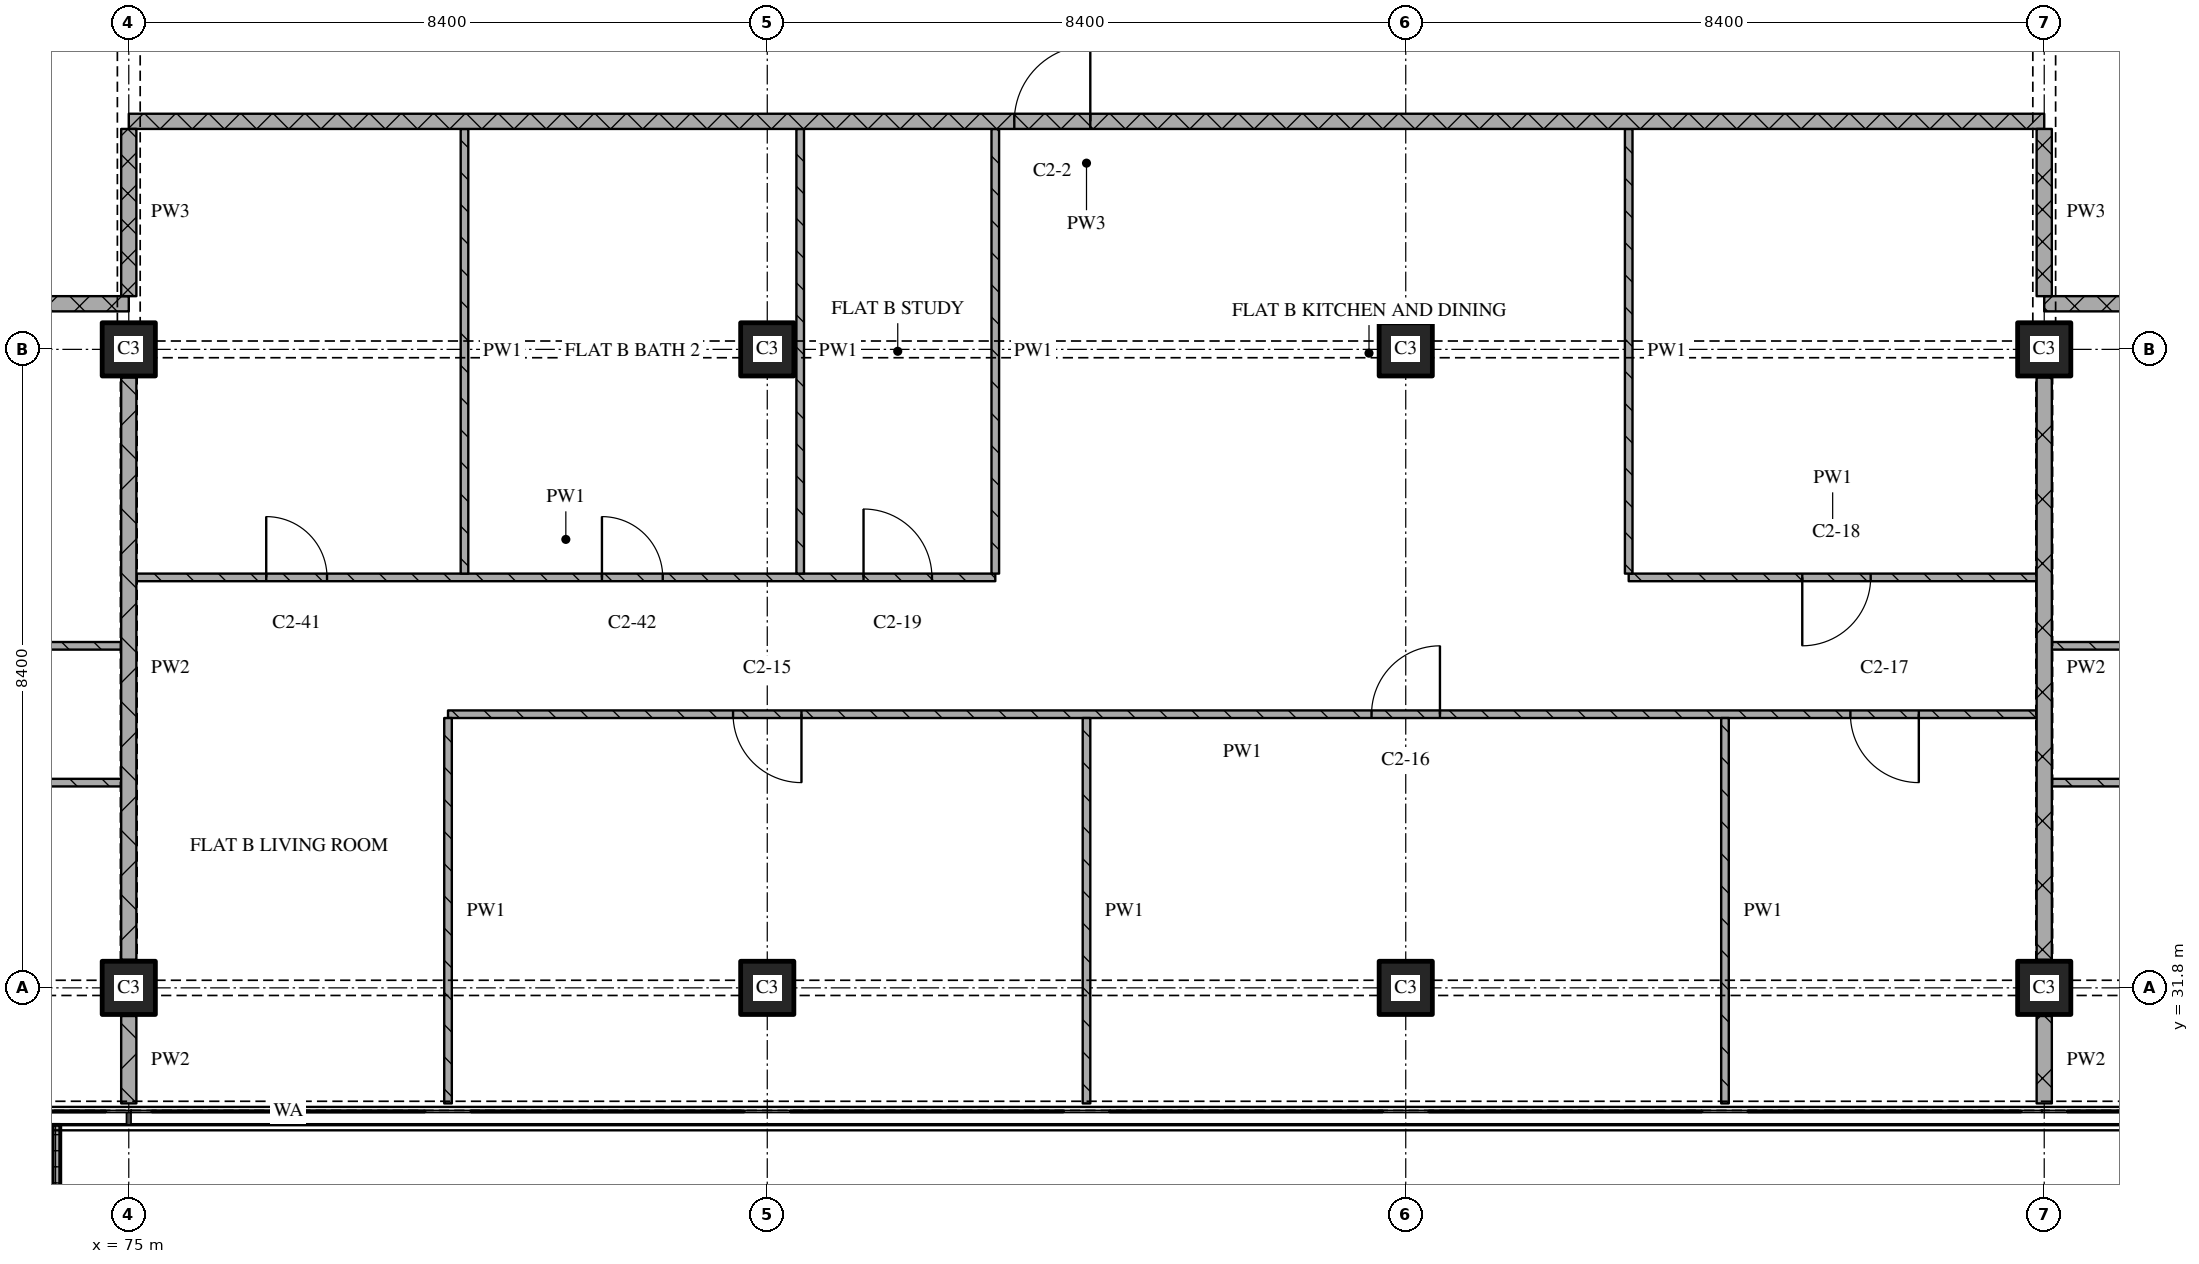
"""IFC4 building model, lengths in metres.
Left out: names, types, materials, properties, quantities, classifications, styles, units other than length and angle.
Written with IfcOpenShell. Run it as: python <this file> out.ifc"""

import sys

from ifc_helpers import new_model, si_unit, direction, frame, frame_2d, origin, origin_2d, place, context, subcontext, project, spatial, polyline, rectangle, outline, extrude, element, fill, save


model = new_model("IFC4")
c1 = context("Model", 3, precision=1e-05, world=origin(), true_north=direction((0.0, 1.0)))
c2 = subcontext(c1, "Body", "Model", "MODEL_VIEW")
j1 = project(units=[si_unit("LENGTHUNIT", "METRE"), si_unit("PLANEANGLEUNIT", "RADIAN")], contexts=[c1])
p1 = place(None, origin())
s1 = spatial("IfcSite", under=j1, at=p1, CompositionType="ELEMENT")
p2 = place(p1, origin())
s2 = spatial("IfcBuilding", under=s1, at=p2, CompositionType="ELEMENT")
p3 = place(p2, frame((0.0, 0.0, 158.25)))
s3 = spatial("IfcBuildingStorey", under=s2, at=p3, CompositionType="ELEMENT", Elevation=158.25)
for number, where, z_axis, x_axis in (
    (1, (75.0, 31.8, 0.0), (0.0, 0.0, 1.0), (1.0, 0.0, 0.0)),
    (2, (75.0, 40.2, 0.0), (0.0, 0.0, 1.0), (1.0, 0.0, 0.0)),
    (3, (83.4, 31.8, 0.0), (0.0, 0.0, 1.0), (1.0, 0.0, 0.0)),
    (4, (83.4, 40.2, 0.0), (0.0, 0.0, 1.0), (1.0, 0.0, 0.0)),
    (5, (91.8, 31.8, 0.0), (0.0, 0.0, 1.0), (1.0, 0.0, 0.0)),
    (6, (91.8, 40.2, 0.0), (0.0, 0.0, 1.0), (1.0, 0.0, 0.0)),
    (7, (100.2, 31.8, 0.0), (0.0, 0.0, 1.0), (1.0, 0.0, 0.0)),
    (8, (100.2, 40.2, 0.0), (0.0, 0.0, 1.0), (1.0, 0.0, 0.0)),
):
    element("IfcColumn", number, at=place(p3, frame(where, z_axis=z_axis, x_axis=x_axis)), inside=s3, PredefinedType="COLUMN", context=c2, shape_type="SweptSolid", body=[
        extrude(rectangle(XDim=0.7, YDim=0.7, at=origin_2d()), origin(), (0.0, 0.0, 1.0), 3.6),
    ])
p4 = place(p3, origin())
e9 = element("IfcWall", 9, at=p4, inside=s3, PredefinedType="SOLIDWALL", context=c2, shape_type="SweptSolid", body=[
    extrude(outline(polyline([(71.7, 30.0), (71.8, 30.0), (71.8, 28.5), (74.0, 28.5), (74.0, 30.0), (74.1, 30.0), (74.1, 28.4), (71.7, 28.4), (71.7, 30.0)])), origin(), (0.0, 0.0, 1.0), 1.0),
])
p5 = place(p3, frame((74.9, 34.5, 0.0), z_axis=(0.0, 0.0, 1.0), x_axis=(-1.0, 0.0, 0.0)))
e10 = element("IfcWall", 10, at=p5, inside=s3, PredefinedType="PARTITIONING", context=c2, shape_type="SweptSolid", body=[
    extrude(rectangle(XDim=16.7, YDim=0.1, at=frame_2d((8.35, 0.0))), origin(), (0.0, 0.0, 1.0), 3.32),
])
p6 = place(p5, frame((1.55, 0.0, 0.0)))
e11 = element("IfcOpeningElement", 11, at=p6, cuts=e10, PredefinedType="OPENING", context=c2, shape_type="SweptSolid", body=[
    extrude(rectangle(XDim=0.9, YDim=2.1, at=frame_2d((0.45, 1.05))), frame((0.0, 0.06, 0.0), z_axis=(0.0, -1.0, 0.0), x_axis=(1.0, 0.0, 0.0)), (0.0, 0.0, 1.0), 0.12),
])
p7 = place(p5, frame((7.85, 0.0, 0.0)))
e12 = element("IfcOpeningElement", 12, at=p7, cuts=e10, PredefinedType="OPENING", context=c2, shape_type="SweptSolid", body=[
    extrude(rectangle(XDim=0.9, YDim=2.1, at=frame_2d((0.45, 1.05))), frame((0.0, 0.06, 0.0), z_axis=(0.0, -1.0, 0.0), x_axis=(1.0, 0.0, 0.0)), (0.0, 0.0, 1.0), 0.12),
])
p8 = place(p5, frame((14.15, 0.0, 0.0)))
e13 = element("IfcOpeningElement", 13, at=p8, cuts=e10, PredefinedType="OPENING", context=c2, shape_type="SweptSolid", body=[
    extrude(rectangle(XDim=0.9, YDim=2.1, at=frame_2d((0.45, 1.05))), frame((0.0, 0.06, 0.0), z_axis=(0.0, -1.0, 0.0), x_axis=(1.0, 0.0, 0.0)), (0.0, 0.0, 1.0), 0.12),
])
p9 = place(p3, frame((117.0, 34.5, 0.0), z_axis=(0.0, 0.0, 1.0), x_axis=(-1.0, 0.0, 0.0)))
e14 = element("IfcWall", 14, at=p9, inside=s3, PredefinedType="PARTITIONING", context=c2, shape_type="SweptSolid", body=[
    extrude(rectangle(XDim=16.7, YDim=0.1, at=frame_2d((8.35, 0.0))), origin(), (0.0, 0.0, 1.0), 3.32),
])
p10 = place(p9, frame((12.15, 0.0, 0.0)))
e15 = element("IfcOpeningElement", 15, at=p10, cuts=e14, PredefinedType="OPENING", context=c2, shape_type="SweptSolid", body=[
    extrude(rectangle(XDim=0.9, YDim=2.1, at=frame_2d((0.45, 1.05))), frame((0.0, 0.06, 0.0), z_axis=(0.0, -1.0, 0.0), x_axis=(1.0, 0.0, 0.0)), (0.0, 0.0, 1.0), 0.12),
])
p11 = place(p3, frame((100.1, 35.4, 0.0), z_axis=(0.0, 0.0, 1.0), x_axis=(-1.0, 0.0, 0.0)))
e16 = element("IfcWall", 16, at=p11, inside=s3, PredefinedType="PARTITIONING", context=c2, shape_type="SweptSolid", body=[
    extrude(rectangle(XDim=20.9, YDim=0.1, at=frame_2d((10.45, 0.0))), origin(), (0.0, 0.0, 1.0), 3.32),
])
p12 = place(p11, frame((1.55, 0.0, 0.0)))
e17 = element("IfcOpeningElement", 17, at=p12, cuts=e16, PredefinedType="OPENING", context=c2, shape_type="SweptSolid", body=[
    extrude(rectangle(XDim=0.9, YDim=2.1, at=frame_2d((0.45, 1.05))), frame((0.0, 0.06, 0.0), z_axis=(0.0, -1.0, 0.0), x_axis=(1.0, 0.0, 0.0)), (0.0, 0.0, 1.0), 0.12),
])
p13 = place(p11, frame((7.85, 0.0, 0.0)))
e18 = element("IfcOpeningElement", 18, at=p13, cuts=e16, PredefinedType="OPENING", context=c2, shape_type="SweptSolid", body=[
    extrude(rectangle(XDim=0.9, YDim=2.1, at=frame_2d((0.45, 1.05))), frame((0.0, 0.06, 0.0), z_axis=(0.0, -1.0, 0.0), x_axis=(1.0, 0.0, 0.0)), (0.0, 0.0, 1.0), 0.12),
])
p14 = place(p11, frame((16.25, 0.0, 0.0)))
e19 = element("IfcOpeningElement", 19, at=p14, cuts=e16, PredefinedType="OPENING", context=c2, shape_type="SweptSolid", body=[
    extrude(rectangle(XDim=0.9, YDim=2.1, at=frame_2d((0.45, 1.05))), frame((0.0, 0.06, 0.0), z_axis=(0.0, -1.0, 0.0), x_axis=(1.0, 0.0, 0.0)), (0.0, 0.0, 1.0), 0.12),
])
p15 = place(p3, frame((66.3, 36.3, 0.0), z_axis=(0.0, 0.0, 1.0), x_axis=(1.0, 0.0, 0.0)))
e20 = element("IfcWall", 20, at=p15, inside=s3, PredefinedType="PARTITIONING", context=c2, shape_type="SweptSolid", body=[
    extrude(rectangle(XDim=8.6, YDim=0.1, at=frame_2d((4.3, 0.0))), origin(), (0.0, 0.0, 1.0), 3.32),
])
p16 = place(p15, frame((6.2, 0.0, 0.0)))
e21 = element("IfcOpeningElement", 21, at=p16, cuts=e20, PredefinedType="OPENING", context=c2, shape_type="SweptSolid", body=[
    extrude(rectangle(XDim=0.8, YDim=2.1, at=frame_2d((0.4, 1.05))), frame((0.0, 0.06, 0.0), z_axis=(0.0, -1.0, 0.0), x_axis=(1.0, 0.0, 0.0)), (0.0, 0.0, 1.0), 0.12),
])
p17 = place(p3, frame((100.3, 36.3, 0.0), z_axis=(0.0, 0.0, 1.0), x_axis=(1.0, 0.0, 0.0)))
e22 = element("IfcWall", 22, at=p17, inside=s3, PredefinedType="PARTITIONING", context=c2, shape_type="SweptSolid", body=[
    extrude(rectangle(XDim=12.2, YDim=0.1, at=frame_2d((6.1, 0.0))), origin(), (0.0, 0.0, 1.0), 3.32),
])
p18 = place(p17, frame((1.75, 0.0, 0.0)))
e23 = element("IfcOpeningElement", 23, at=p18, cuts=e22, PredefinedType="OPENING", context=c2, shape_type="SweptSolid", body=[
    extrude(rectangle(XDim=0.8, YDim=2.1, at=frame_2d((0.4, 1.05))), frame((0.0, 0.06, 0.0), z_axis=(0.0, -1.0, 0.0), x_axis=(1.0, 0.0, 0.0)), (0.0, 0.0, 1.0), 0.12),
])
p19 = place(p17, frame((6.25, 0.0, 0.0)))
e24 = element("IfcOpeningElement", 24, at=p19, cuts=e22, PredefinedType="OPENING", context=c2, shape_type="SweptSolid", body=[
    extrude(rectangle(XDim=0.8, YDim=2.1, at=frame_2d((0.4, 1.05))), frame((0.0, 0.06, 0.0), z_axis=(0.0, -1.0, 0.0), x_axis=(1.0, 0.0, 0.0)), (0.0, 0.0, 1.0), 0.12),
])
p20 = place(p3, frame((75.1, 37.2, 0.0), z_axis=(0.0, 0.0, 1.0), x_axis=(1.0, 0.0, 0.0)))
e25 = element("IfcWall", 25, at=p20, inside=s3, PredefinedType="PARTITIONING", context=c2, shape_type="SweptSolid", body=[
    extrude(rectangle(XDim=11.3, YDim=0.1, at=frame_2d((5.65, 0.0))), origin(), (0.0, 0.0, 1.0), 3.32),
])
p21 = place(p20, frame((1.708, 0.0, 0.0)))
e26 = element("IfcOpeningElement", 26, at=p21, cuts=e25, PredefinedType="OPENING", context=c2, shape_type="SweptSolid", body=[
    extrude(rectangle(XDim=0.8, YDim=2.1, at=frame_2d((0.4, 1.05))), frame((0.0, 0.06, 0.0), z_axis=(0.0, -1.0, 0.0), x_axis=(1.0, 0.0, 0.0)), (0.0, 0.0, 1.0), 0.12),
])
p22 = place(p20, frame((6.125, 0.0, 0.0)))
e27 = element("IfcOpeningElement", 27, at=p22, cuts=e25, PredefinedType="OPENING", context=c2, shape_type="SweptSolid", body=[
    extrude(rectangle(XDim=0.8, YDim=2.1, at=frame_2d((0.4, 1.05))), frame((0.0, 0.06, 0.0), z_axis=(0.0, -1.0, 0.0), x_axis=(1.0, 0.0, 0.0)), (0.0, 0.0, 1.0), 0.12),
])
p23 = place(p20, frame((9.567, 0.0, 0.0)))
e28 = element("IfcOpeningElement", 28, at=p23, cuts=e25, PredefinedType="OPENING", context=c2, shape_type="SweptSolid", body=[
    extrude(rectangle(XDim=0.9, YDim=2.1, at=frame_2d((0.45, 1.05))), frame((0.0, 0.06, 0.0), z_axis=(0.0, -1.0, 0.0), x_axis=(1.0, 0.0, 0.0)), (0.0, 0.0, 1.0), 0.12),
])
p24 = place(p3, frame((94.733, 37.2, 0.0), z_axis=(0.0, 0.0, 1.0), x_axis=(1.0, 0.0, 0.0)))
e29 = element("IfcWall", 29, at=p24, inside=s3, PredefinedType="PARTITIONING", context=c2, shape_type="SweptSolid", body=[
    extrude(rectangle(XDim=5.367, YDim=0.1, at=frame_2d((2.683, 0.0))), origin(), (0.0, 0.0, 1.0), 3.32),
])
p25 = place(p24, frame((2.283, 0.0, 0.0)))
e30 = element("IfcOpeningElement", 30, at=p25, cuts=e29, PredefinedType="OPENING", context=c2, shape_type="SweptSolid", body=[
    extrude(rectangle(XDim=0.9, YDim=2.1, at=frame_2d((0.45, 1.05))), frame((0.0, 0.06, 0.0), z_axis=(0.0, -1.0, 0.0), x_axis=(1.0, 0.0, 0.0)), (0.0, 0.0, 1.0), 0.12),
])
p26 = place(p3, frame((75.0, 40.8, 0.0), z_axis=(0.0, 0.0, 1.0), x_axis=(-1.0, 0.0, 0.0)))
e31 = element("IfcWall", 31, at=p26, inside=s3, PredefinedType="PARTITIONING", context=c2, shape_type="SweptSolid", body=[
    extrude(rectangle(XDim=24.28, YDim=0.2, at=frame_2d((12.14, 0.0))), origin(), (0.0, 0.0, 1.0), 3.32),
])
p27 = place(p26, frame((8.95, 0.0, 0.0)))
e32 = element("IfcOpeningElement", 32, at=p27, cuts=e31, PredefinedType="OPENING", context=c2, shape_type="SweptSolid", body=[
    extrude(rectangle(XDim=1.0, YDim=2.1, at=frame_2d((0.5, 1.05))), frame((0.0, 0.11, 0.0), z_axis=(0.0, -1.0, 0.0), x_axis=(1.0, 0.0, 0.0)), (0.0, 0.0, 1.0), 0.22),
])
p28 = place(p3, frame((124.48, 40.8, 0.0), z_axis=(0.0, 0.0, 1.0), x_axis=(-1.0, 0.0, 0.0)))
e33 = element("IfcWall", 33, at=p28, inside=s3, PredefinedType="PARTITIONING", context=c2, shape_type="SweptSolid", body=[
    extrude(rectangle(XDim=24.28, YDim=0.2, at=frame_2d((12.14, 0.0))), origin(), (0.0, 0.0, 1.0), 3.32),
])
p29 = place(p28, frame((10.73, 0.0, 0.0)))
e34 = element("IfcOpeningElement", 34, at=p29, cuts=e33, PredefinedType="OPENING", context=c2, shape_type="SweptSolid", body=[
    extrude(rectangle(XDim=1.0, YDim=2.1, at=frame_2d((0.5, 1.05))), frame((0.0, 0.11, 0.0), z_axis=(0.0, -1.0, 0.0), x_axis=(1.0, 0.0, 0.0)), (0.0, 0.0, 1.0), 0.22),
])
p30 = place(p3, frame((100.2, 43.2, 0.0), z_axis=(0.0, 0.0, 1.0), x_axis=(-1.0, 0.0, 0.0)))
e35 = element("IfcWall", 35, at=p30, inside=s3, PredefinedType="PARTITIONING", context=c2, shape_type="SweptSolid", body=[
    extrude(rectangle(XDim=25.2, YDim=0.2, at=frame_2d((12.6, 0.0))), origin(), (0.0, 0.0, 1.0), 3.32),
])
p31 = place(p30, frame((12.55, 0.0, 0.0)))
e36 = element("IfcOpeningElement", 36, at=p31, cuts=e35, PredefinedType="OPENING", context=c2, shape_type="SweptSolid", body=[
    extrude(rectangle(XDim=1.0, YDim=2.1, at=frame_2d((0.5, 1.05))), frame((0.0, 0.11, 0.0), z_axis=(0.0, -1.0, 0.0), x_axis=(1.0, 0.0, 0.0)), (0.0, 0.0, 1.0), 0.22),
])
p32 = place(p3, frame((75.0, 43.1, 0.0), z_axis=(0.0, 0.0, 1.0), x_axis=(0.0, -1.0, 0.0)))
e37 = element("IfcWall", 37, at=p32, inside=s3, PredefinedType="PARTITIONING", context=c2, shape_type="SweptSolid", body=[
    extrude(rectangle(XDim=2.2, YDim=0.2, at=frame_2d((1.1, 0.0))), origin(), (0.0, 0.0, 1.0), 2.43),
])
p33 = place(p3, frame((75.0, 31.43, 0.0), z_axis=(0.0, 0.0, 1.0), x_axis=(0.0, -1.0, 0.0)))
e38 = element("IfcWall", 38, at=p33, inside=s3, PredefinedType="PARTITIONING", context=c2, shape_type="SweptSolid", body=[
    extrude(rectangle(XDim=1.15, YDim=0.2, at=frame_2d((0.575, 0.0))), origin(), (0.0, 0.0, 1.0), 3.32),
])
p34 = place(p3, frame((75.0, 39.83, 0.0), z_axis=(0.0, 0.0, 1.0), x_axis=(0.0, -1.0, 0.0)))
e39 = element("IfcWall", 39, at=p34, inside=s3, PredefinedType="PARTITIONING", context=c2, shape_type="SweptSolid", body=[
    extrude(rectangle(XDim=7.66, YDim=0.2, at=frame_2d((3.83, 0.0))), origin(), (0.0, 0.0, 1.0), 2.72),
])
p35 = place(p3, frame((79.2, 35.35, 0.0), z_axis=(0.0, 0.0, 1.0), x_axis=(0.0, -1.0, 0.0)))
e40 = element("IfcWall", 40, at=p35, inside=s3, PredefinedType="PARTITIONING", context=c2, shape_type="SweptSolid", body=[
    extrude(rectangle(XDim=5.07, YDim=0.1, at=frame_2d((2.535, 0.0))), origin(), (0.0, 0.0, 1.0), 3.32),
])
for number, where, z_axis, x_axis in (
    (41, (79.417, 43.1, 0.0), (0.0, 0.0, 1.0), (0.0, -1.0, 0.0)),
    (42, (83.833, 43.1, 0.0), (0.0, 0.0, 1.0), (0.0, -1.0, 0.0)),
    (43, (86.4, 43.1, 0.0), (0.0, 0.0, 1.0), (0.0, -1.0, 0.0)),
):
    element("IfcWall", number, at=place(p3, frame(where, z_axis=z_axis, x_axis=x_axis)), inside=s3, PredefinedType="PARTITIONING", context=c2, shape_type="SweptSolid", body=[
        extrude(rectangle(XDim=5.85, YDim=0.1, at=frame_2d((2.925, 0.0))), origin(), (0.0, 0.0, 1.0), 3.32),
    ])
p36 = place(p3, frame((87.6, 35.35, 0.0), z_axis=(0.0, 0.0, 1.0), x_axis=(0.0, -1.0, 0.0)))
e44 = element("IfcWall", 44, at=p36, inside=s3, PredefinedType="PARTITIONING", context=c2, shape_type="SweptSolid", body=[
    extrude(rectangle(XDim=5.07, YDim=0.1, at=frame_2d((2.535, 0.0))), origin(), (0.0, 0.0, 1.0), 3.32),
])
p37 = place(p3, frame((94.733, 43.1, 0.0), z_axis=(0.0, 0.0, 1.0), x_axis=(0.0, -1.0, 0.0)))
e45 = element("IfcWall", 45, at=p37, inside=s3, PredefinedType="PARTITIONING", context=c2, shape_type="SweptSolid", body=[
    extrude(rectangle(XDim=5.85, YDim=0.1, at=frame_2d((2.925, 0.0))), origin(), (0.0, 0.0, 1.0), 3.32),
])
p38 = place(p3, frame((96.0, 35.35, 0.0), z_axis=(0.0, 0.0, 1.0), x_axis=(0.0, -1.0, 0.0)))
e46 = element("IfcWall", 46, at=p38, inside=s3, PredefinedType="PARTITIONING", context=c2, shape_type="SweptSolid", body=[
    extrude(rectangle(XDim=5.07, YDim=0.1, at=frame_2d((2.535, 0.0))), origin(), (0.0, 0.0, 1.0), 3.32),
])
p39 = place(p3, frame((100.2, 43.1, 0.0), z_axis=(0.0, 0.0, 1.0), x_axis=(0.0, -1.0, 0.0)))
e47 = element("IfcWall", 47, at=p39, inside=s3, PredefinedType="PARTITIONING", context=c2, shape_type="SweptSolid", body=[
    extrude(rectangle(XDim=2.2, YDim=0.2, at=frame_2d((1.1, 0.0))), origin(), (0.0, 0.0, 1.0), 2.43),
])
p40 = place(p3, frame((100.2, 31.43, 0.0), z_axis=(0.0, 0.0, 1.0), x_axis=(0.0, -1.0, 0.0)))
e48 = element("IfcWall", 48, at=p40, inside=s3, PredefinedType="PARTITIONING", context=c2, shape_type="SweptSolid", body=[
    extrude(rectangle(XDim=1.15, YDim=0.2, at=frame_2d((0.575, 0.0))), origin(), (0.0, 0.0, 1.0), 3.32),
])
p41 = place(p3, frame((100.2, 39.83, 0.0), z_axis=(0.0, 0.0, 1.0), x_axis=(0.0, -1.0, 0.0)))
e49 = element("IfcWall", 49, at=p41, inside=s3, PredefinedType="PARTITIONING", context=c2, shape_type="SweptSolid", body=[
    extrude(rectangle(XDim=7.66, YDim=0.2, at=frame_2d((3.83, 0.0))), origin(), (0.0, 0.0, 1.0), 2.72),
])
p42 = place(p12, origin())
e50 = element("IfcDoor", 50, at=p42, inside=s3, OperationType="SINGLE_SWING_LEFT", PredefinedType="DOOR", context=c2, shape_type="SweptSolid", body=[
    extrude(rectangle(XDim=0.9, YDim=2.1, at=frame_2d((0.45, 1.05))), frame((0.0, 0.025, 0.0), z_axis=(0.0, -1.0, 0.0), x_axis=(1.0, 0.0, 0.0)), (0.0, 0.0, 1.0), 0.05),
])
fill(e17, e50)
p43 = place(p13, origin())
e51 = element("IfcDoor", 51, at=p43, inside=s3, OperationType="SINGLE_SWING_RIGHT", PredefinedType="DOOR", context=c2, shape_type="SweptSolid", body=[
    extrude(rectangle(XDim=0.9, YDim=2.1, at=frame_2d((0.45, 1.05))), frame((0.0, 0.025, 0.0), z_axis=(0.0, -1.0, 0.0), x_axis=(1.0, 0.0, 0.0)), (0.0, 0.0, 1.0), 0.05),
])
fill(e18, e51)
p44 = place(p14, origin())
e52 = element("IfcDoor", 52, at=p44, inside=s3, OperationType="SINGLE_SWING_LEFT", PredefinedType="DOOR", context=c2, shape_type="SweptSolid", body=[
    extrude(rectangle(XDim=0.9, YDim=2.1, at=frame_2d((0.45, 1.05))), frame((0.0, 0.025, 0.0), z_axis=(0.0, -1.0, 0.0), x_axis=(1.0, 0.0, 0.0)), (0.0, 0.0, 1.0), 0.05),
])
fill(e19, e52)
p45 = place(p21, origin())
e53 = element("IfcDoor", 53, at=p45, inside=s3, OperationType="SINGLE_SWING_LEFT", PredefinedType="DOOR", context=c2, shape_type="SweptSolid", body=[
    extrude(rectangle(XDim=0.8, YDim=2.1, at=frame_2d((0.4, 1.05))), frame((0.0, 0.025, 0.0), z_axis=(0.0, -1.0, 0.0), x_axis=(1.0, 0.0, 0.0)), (0.0, 0.0, 1.0), 0.05),
])
fill(e26, e53)
p46 = place(p22, origin())
e54 = element("IfcDoor", 54, at=p46, inside=s3, OperationType="SINGLE_SWING_LEFT", PredefinedType="DOOR", context=c2, shape_type="SweptSolid", body=[
    extrude(rectangle(XDim=0.8, YDim=2.1, at=frame_2d((0.4, 1.05))), frame((0.0, 0.025, 0.0), z_axis=(0.0, -1.0, 0.0), x_axis=(1.0, 0.0, 0.0)), (0.0, 0.0, 1.0), 0.05),
])
fill(e27, e54)
p47 = place(p23, origin())
e55 = element("IfcDoor", 55, at=p47, inside=s3, OperationType="SINGLE_SWING_LEFT", PredefinedType="DOOR", context=c2, shape_type="SweptSolid", body=[
    extrude(rectangle(XDim=0.9, YDim=2.1, at=frame_2d((0.45, 1.05))), frame((0.0, 0.025, 0.0), z_axis=(0.0, -1.0, 0.0), x_axis=(1.0, 0.0, 0.0)), (0.0, 0.0, 1.0), 0.05),
])
fill(e28, e55)
p48 = place(p25, origin())
e56 = element("IfcDoor", 56, at=p48, inside=s3, OperationType="SINGLE_SWING_RIGHT", PredefinedType="DOOR", context=c2, shape_type="SweptSolid", body=[
    extrude(rectangle(XDim=0.9, YDim=2.1, at=frame_2d((0.45, 1.05))), frame((0.0, 0.025, 0.0), z_axis=(0.0, -1.0, 0.0), x_axis=(1.0, 0.0, 0.0)), (0.0, 0.0, 1.0), 0.05),
])
fill(e30, e56)
p49 = place(p31, origin())
e57 = element("IfcDoor", 57, at=p49, inside=s3, OperationType="SINGLE_SWING_RIGHT", PredefinedType="DOOR", context=c2, shape_type="SweptSolid", body=[
    extrude(rectangle(XDim=1.0, YDim=2.1, at=frame_2d((0.5, 1.05))), frame((0.0, 0.025, 0.0), z_axis=(0.0, -1.0, 0.0), x_axis=(1.0, 0.0, 0.0)), (0.0, 0.0, 1.0), 0.05),
])
fill(e36, e57)
save(model, sys.argv[1])
